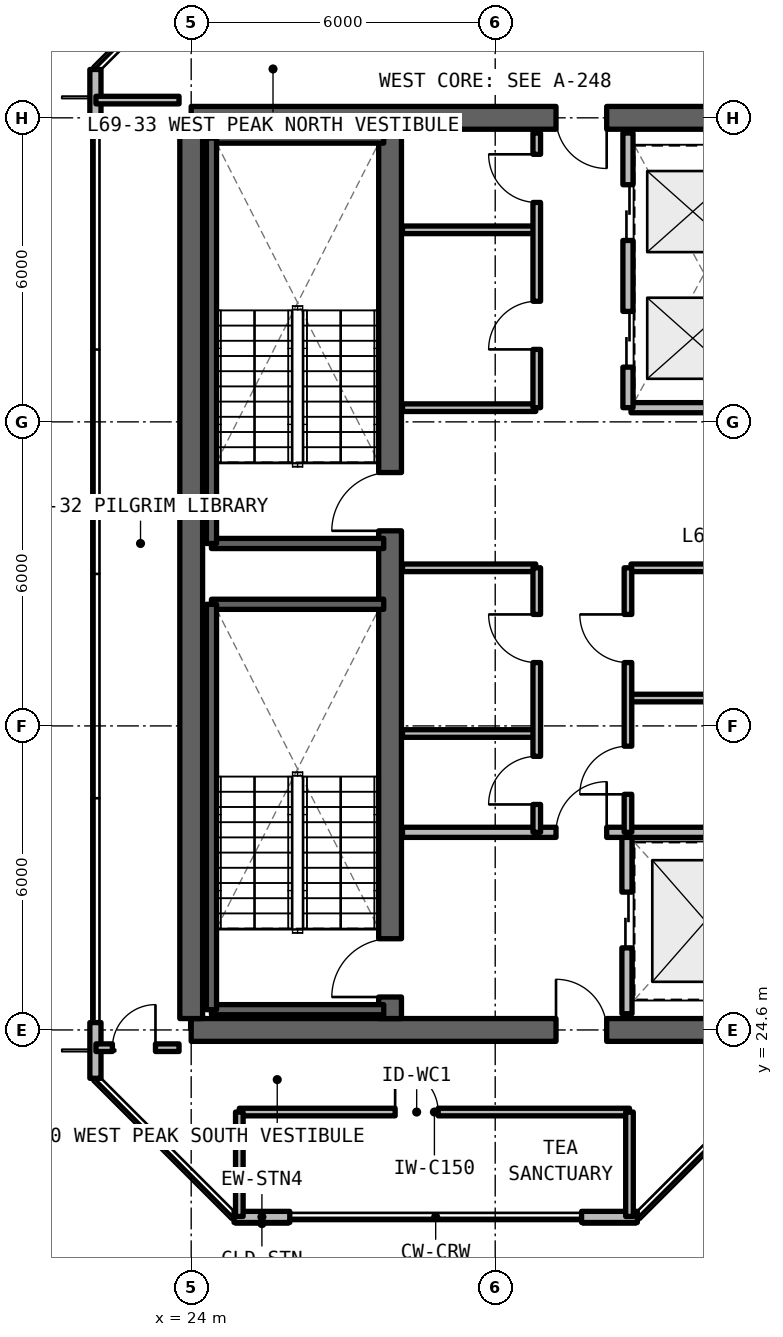
"""IFC4 building model, lengths in metres.
Left out: names, types, materials, properties, quantities, classifications, styles, units other than length and angle.
Written with IfcOpenShell. Run it as: python <this file> out.ifc"""

import sys

from ifc_helpers import new_model, si_unit, direction, frame, frame_2d, origin, place, context, subcontext, project, spatial, rectangle, extrude, element, fill, save


model = new_model("IFC4")
c1 = context("Model", 3, precision=1e-05, world=origin(), true_north=direction((0.0, 1.0)))
c2 = subcontext(c1, "Body", "Model", "MODEL_VIEW")
j1 = project(units=[si_unit("LENGTHUNIT", "METRE"), si_unit("PLANEANGLEUNIT", "RADIAN")], contexts=[c1])
p1 = place(None, origin())
s1 = spatial("IfcSite", under=j1, at=p1, CompositionType="ELEMENT")
p2 = place(p1, origin())
s2 = spatial("IfcBuilding", under=s1, at=p2, CompositionType="ELEMENT")
p3 = place(p2, frame((0.0, 0.0, 246.18)))
s3 = spatial("IfcBuildingStorey", under=s2, at=p3, CompositionType="ELEMENT", Elevation=246.18)
p4 = place(p3, frame((24.0, 24.6, 0.0), z_axis=(0.0, 0.0, 1.0), x_axis=(1.0, 0.0, 0.0)))
e1 = element("IfcWall", 1, at=p4, inside=s3, PredefinedType="SHEAR", context=c2, shape_type="SweptSolid", body=[
    extrude(rectangle(XDim=12.0, YDim=0.45, at=frame_2d((6.0, 0.0))), origin(), (0.0, 0.0, 1.0), 3.63),
])
p5 = place(p4, frame((7.2, 0.0, 0.0)))
e2 = element("IfcOpeningElement", 2, at=p5, cuts=e1, PredefinedType="OPENING", context=c2, shape_type="SweptSolid", body=[
    extrude(rectangle(XDim=1.0, YDim=2.15, at=frame_2d((0.5, 1.075))), frame((0.0, 0.235, 0.0), z_axis=(0.0, -1.0, 0.0), x_axis=(1.0, 0.0, 0.0)), (0.0, 0.0, 1.0), 0.47),
])
p6 = place(p3, frame((36.0, 42.6, 0.0), z_axis=(0.0, 0.0, 1.0), x_axis=(-1.0, 0.0, 0.0)))
e3 = element("IfcWall", 3, at=p6, inside=s3, PredefinedType="SHEAR", context=c2, shape_type="SweptSolid", body=[
    extrude(rectangle(XDim=12.0, YDim=0.45, at=frame_2d((6.0, 0.0))), origin(), (0.0, 0.0, 1.0), 3.63),
])
p7 = place(p6, frame((3.8, 0.0, 0.0)))
e4 = element("IfcOpeningElement", 4, at=p7, cuts=e3, PredefinedType="OPENING", context=c2, shape_type="SweptSolid", body=[
    extrude(rectangle(XDim=1.0, YDim=2.15, at=frame_2d((0.5, 1.075))), frame((0.0, 0.235, 0.0), z_axis=(0.0, -1.0, 0.0), x_axis=(1.0, 0.0, 0.0)), (0.0, 0.0, 1.0), 0.47),
])
p8 = place(p3, frame((24.0, 24.825, 0.0), z_axis=(0.0, 0.0, 1.0), x_axis=(0.0, 1.0, 0.0)))
e5 = element("IfcWall", 5, at=p8, inside=s3, PredefinedType="SHEAR", context=c2, shape_type="SweptSolid", body=[
    extrude(rectangle(XDim=17.55, YDim=0.45, at=frame_2d((8.775, 0.0))), origin(), (0.0, 0.0, 1.0), 3.63),
])
p9 = place(p3, frame((27.925, 24.825, 0.0), z_axis=(0.0, 0.0, 1.0), x_axis=(0.0, 1.0, 0.0)))
e6 = element("IfcWall", 6, at=p9, inside=s3, PredefinedType="SHEAR", context=c2, shape_type="SweptSolid", body=[
    extrude(rectangle(XDim=17.55, YDim=0.45, at=frame_2d((8.775, 0.0))), origin(), (0.0, 0.0, 1.0), 3.63),
])
p10 = place(p9, frame((0.425, 0.0, 0.0)))
e7 = element("IfcOpeningElement", 7, at=p10, cuts=e6, PredefinedType="OPENING", context=c2, shape_type="SweptSolid", body=[
    extrude(rectangle(XDim=1.15, YDim=2.15, at=frame_2d((0.575, 1.075))), frame((0.0, 0.235, 0.0), z_axis=(0.0, -1.0, 0.0), x_axis=(1.0, 0.0, 0.0)), (0.0, 0.0, 1.0), 0.47),
])
p11 = place(p9, frame((9.625, 0.0, 0.0)))
e8 = element("IfcOpeningElement", 8, at=p11, cuts=e6, PredefinedType="OPENING", context=c2, shape_type="SweptSolid", body=[
    extrude(rectangle(XDim=1.15, YDim=2.15, at=frame_2d((0.575, 1.075))), frame((0.0, 0.235, 0.0), z_axis=(0.0, -1.0, 0.0), x_axis=(1.0, 0.0, 0.0)), (0.0, 0.0, 1.0), 0.47),
])
p12 = place(p3, frame((24.846, 20.91, 0.0), z_axis=(0.0, 0.0, 1.0), x_axis=(1.0, 0.0, 0.0)))
e9 = element("IfcWall", 9, at=p12, inside=s3, PredefinedType="SOLIDWALL", context=c2, shape_type="SweptSolid", body=[
    extrude(rectangle(XDim=1.1, YDim=0.22, at=frame_2d((0.55, 0.0))), origin(), (0.0, 0.0, 1.0), 3.41),
])
for number, where, z_axis, x_axis in (
    (10, (31.704, 20.91, 0.0), (0.0, 0.0, 1.0), (1.0, 0.0, 0.0)),
    (11, (22.11, 43.554, 0.0), (0.0, 0.0, 1.0), (0.0, -1.0, 0.0)),
    (12, (22.11, 24.746, 0.0), (0.0, 0.0, 1.0), (0.0, -1.0, 0.0)),
):
    element("IfcWall", number, at=place(p3, frame(where, z_axis=z_axis, x_axis=x_axis)), inside=s3, PredefinedType="SOLIDWALL", context=c2, shape_type="SweptSolid", body=[
        extrude(rectangle(XDim=1.1, YDim=0.22, at=frame_2d((0.55, 0.0))), origin(), (0.0, 0.0, 1.0), 3.41),
    ])
p13 = place(p3, frame((32.6, 24.92, 0.0), z_axis=(0.0, 0.0, 1.0), x_axis=(0.0, 1.0, 0.0)))
e13 = element("IfcWall", 13, at=p13, inside=s3, PredefinedType="SOLIDWALL", context=c2, shape_type="SweptSolid", body=[
    extrude(rectangle(XDim=3.58, YDim=0.2, at=frame_2d((1.79, 0.0))), origin(), (0.0, 0.0, 1.0), 2.63),
])
p14 = place(p13, frame((1.3, 0.0, 0.0)))
e14 = element("IfcOpeningElement", 14, at=p14, cuts=e13, PredefinedType="OPENING", context=c2, shape_type="SweptSolid", body=[
    extrude(rectangle(XDim=1.1, YDim=2.2, at=frame_2d((0.55, 1.1))), frame((0.0, 0.11, 0.0), z_axis=(0.0, -1.0, 0.0), x_axis=(1.0, 0.0, 0.0)), (0.0, 0.0, 1.0), 0.22),
])
p15 = place(p3, frame((28.17, 28.5, 0.0), z_axis=(0.0, 0.0, 1.0), x_axis=(1.0, 0.0, 0.0)))
e15 = element("IfcWall", 15, at=p15, inside=s3, PredefinedType="SOLIDWALL", context=c2, shape_type="SweptSolid", body=[
    extrude(rectangle(XDim=7.585, YDim=0.2, at=frame_2d((3.792, 0.0))), origin(), (0.0, 0.0, 1.0), 2.63),
])
p16 = place(p15, frame((3.03, 0.0, 0.0)))
e16 = element("IfcOpeningElement", 16, at=p16, cuts=e15, PredefinedType="OPENING", context=c2, shape_type="SweptSolid", body=[
    extrude(rectangle(XDim=1.0, YDim=2.15, at=frame_2d((0.5, 1.075))), frame((0.0, 0.11, 0.0), z_axis=(0.0, -1.0, 0.0), x_axis=(1.0, 0.0, 0.0)), (0.0, 0.0, 1.0), 0.22),
])
for number, where, z_axis, x_axis in (
    (17, (28.17, 30.45, 0.0), (0.0, 0.0, 1.0), (1.0, 0.0, 0.0)),
    (18, (28.17, 33.72, 0.0), (0.0, 0.0, 1.0), (1.0, 0.0, 0.0)),
):
    element("IfcWall", number, at=place(p3, frame(where, z_axis=z_axis, x_axis=x_axis)), inside=s3, PredefinedType="SOLIDWALL", context=c2, shape_type="SweptSolid", body=[
        extrude(rectangle(XDim=2.63, YDim=0.15, at=frame_2d((1.315, 0.0))), origin(), (0.0, 0.0, 1.0), 2.63),
    ])
p17 = place(p3, frame((30.82, 28.5, 0.0), z_axis=(0.0, 0.0, 1.0), x_axis=(0.0, 1.0, 0.0)))
e19 = element("IfcWall", 19, at=p17, inside=s3, PredefinedType="SOLIDWALL", context=c2, shape_type="SweptSolid", body=[
    extrude(rectangle(XDim=5.22, YDim=0.15, at=frame_2d((2.61, 0.0))), origin(), (0.0, 0.0, 1.0), 2.63),
])
p18 = place(p17, frame((0.55, 0.0, 0.0)))
e20 = element("IfcOpeningElement", 20, at=p18, cuts=e19, PredefinedType="OPENING", context=c2, shape_type="SweptSolid", body=[
    extrude(rectangle(XDim=0.95, YDim=2.15, at=frame_2d((0.475, 1.075))), frame((0.0, 0.085, 0.0), z_axis=(0.0, -1.0, 0.0), x_axis=(1.0, 0.0, 0.0)), (0.0, 0.0, 1.0), 0.17),
])
p19 = place(p17, frame((3.35, 0.0, 0.0)))
e21 = element("IfcOpeningElement", 21, at=p19, cuts=e19, PredefinedType="OPENING", context=c2, shape_type="SweptSolid", body=[
    extrude(rectangle(XDim=0.95, YDim=2.15, at=frame_2d((0.475, 1.075))), frame((0.0, 0.085, 0.0), z_axis=(0.0, -1.0, 0.0), x_axis=(1.0, 0.0, 0.0)), (0.0, 0.0, 1.0), 0.17),
])
for number, where, z_axis, x_axis in (
    (22, (32.68, 31.15, 0.0), (0.0, 0.0, 1.0), (1.0, 0.0, 0.0)),
    (23, (32.68, 33.72, 0.0), (0.0, 0.0, 1.0), (1.0, 0.0, 0.0)),
):
    element("IfcWall", number, at=place(p3, frame(where, z_axis=z_axis, x_axis=x_axis)), inside=s3, PredefinedType="SOLIDWALL", context=c2, shape_type="SweptSolid", body=[
        extrude(rectangle(XDim=3.075, YDim=0.15, at=frame_2d((1.538, 0.0))), origin(), (0.0, 0.0, 1.0), 2.63),
    ])
p20 = place(p3, frame((32.62, 28.5, 0.0), z_axis=(0.0, 0.0, 1.0), x_axis=(0.0, 1.0, 0.0)))
e24 = element("IfcWall", 24, at=p20, inside=s3, PredefinedType="SOLIDWALL", context=c2, shape_type="SweptSolid", body=[
    extrude(rectangle(XDim=5.22, YDim=0.15, at=frame_2d((2.61, 0.0))), origin(), (0.0, 0.0, 1.0), 2.63),
])
p21 = place(p20, frame((0.75, 0.0, 0.0)))
e25 = element("IfcOpeningElement", 25, at=p21, cuts=e24, PredefinedType="OPENING", context=c2, shape_type="SweptSolid", body=[
    extrude(rectangle(XDim=0.95, YDim=2.15, at=frame_2d((0.475, 1.075))), frame((0.0, 0.085, 0.0), z_axis=(0.0, -1.0, 0.0), x_axis=(1.0, 0.0, 0.0)), (0.0, 0.0, 1.0), 0.17),
])
p22 = place(p20, frame((3.35, 0.0, 0.0)))
e26 = element("IfcOpeningElement", 26, at=p22, cuts=e24, PredefinedType="OPENING", context=c2, shape_type="SweptSolid", body=[
    extrude(rectangle(XDim=0.95, YDim=2.15, at=frame_2d((0.475, 1.075))), frame((0.0, 0.085, 0.0), z_axis=(0.0, -1.0, 0.0), x_axis=(1.0, 0.0, 0.0)), (0.0, 0.0, 1.0), 0.17),
])
for number, where, z_axis, x_axis in (
    (27, (28.17, 36.88, 0.0), (0.0, 0.0, 1.0), (1.0, 0.0, 0.0)),
    (28, (28.17, 40.39, 0.0), (0.0, 0.0, 1.0), (1.0, 0.0, 0.0)),
):
    element("IfcWall", number, at=place(p3, frame(where, z_axis=z_axis, x_axis=x_axis)), inside=s3, PredefinedType="SOLIDWALL", context=c2, shape_type="SweptSolid", body=[
        extrude(rectangle(XDim=2.63, YDim=0.15, at=frame_2d((1.315, 0.0))), origin(), (0.0, 0.0, 1.0), 2.63),
    ])
p23 = place(p3, frame((30.82, 36.88, 0.0), z_axis=(0.0, 0.0, 1.0), x_axis=(0.0, 1.0, 0.0)))
e29 = element("IfcWall", 29, at=p23, inside=s3, PredefinedType="SOLIDWALL", context=c2, shape_type="SweptSolid", body=[
    extrude(rectangle(XDim=5.42, YDim=0.15, at=frame_2d((2.71, 0.0))), origin(), (0.0, 0.0, 1.0), 2.63),
])
p24 = place(p23, frame((1.15, 0.0, 0.0)))
e30 = element("IfcOpeningElement", 30, at=p24, cuts=e29, PredefinedType="OPENING", context=c2, shape_type="SweptSolid", body=[
    extrude(rectangle(XDim=0.95, YDim=2.15, at=frame_2d((0.475, 1.075))), frame((0.0, 0.085, 0.0), z_axis=(0.0, -1.0, 0.0), x_axis=(1.0, 0.0, 0.0)), (0.0, 0.0, 1.0), 0.17),
])
p25 = place(p23, frame((4.05, 0.0, 0.0)))
e31 = element("IfcOpeningElement", 31, at=p25, cuts=e29, PredefinedType="OPENING", context=c2, shape_type="SweptSolid", body=[
    extrude(rectangle(XDim=0.95, YDim=2.15, at=frame_2d((0.475, 1.075))), frame((0.0, 0.085, 0.0), z_axis=(0.0, -1.0, 0.0), x_axis=(1.0, 0.0, 0.0)), (0.0, 0.0, 1.0), 0.17),
])
p26 = place(p3, frame((32.68, 36.88, 0.0), z_axis=(0.0, 0.0, 1.0), x_axis=(1.0, 0.0, 0.0)))
e32 = element("IfcWall", 32, at=p26, inside=s3, PredefinedType="SOLIDWALL", context=c2, shape_type="SweptSolid", body=[
    extrude(rectangle(XDim=3.075, YDim=0.2, at=frame_2d((1.538, 0.0))), origin(), (0.0, 0.0, 1.0), 2.63),
])
p27 = place(p3, frame((32.62, 36.88, 0.0), z_axis=(0.0, 0.0, 1.0), x_axis=(0.0, 1.0, 0.0)))
e33 = element("IfcWall", 33, at=p27, inside=s3, PredefinedType="SOLIDWALL", context=c2, shape_type="SweptSolid", body=[
    extrude(rectangle(XDim=5.42, YDim=0.2, at=frame_2d((2.71, 0.0))), origin(), (0.0, 0.0, 1.0), 2.63),
])
p28 = place(p27, frame((0.8, 0.0, 0.0)))
e34 = element("IfcOpeningElement", 34, at=p28, cuts=e33, PredefinedType="OPENING", context=c2, shape_type="SweptSolid", body=[
    extrude(rectangle(XDim=1.1, YDim=2.2, at=frame_2d((0.55, 1.1))), frame((0.0, 0.11, 0.0), z_axis=(0.0, -1.0, 0.0), x_axis=(1.0, 0.0, 0.0)), (0.0, 0.0, 1.0), 0.22),
])
p29 = place(p27, frame((3.3, 0.0, 0.0)))
e35 = element("IfcOpeningElement", 35, at=p29, cuts=e33, PredefinedType="OPENING", context=c2, shape_type="SweptSolid", body=[
    extrude(rectangle(XDim=1.1, YDim=2.2, at=frame_2d((0.55, 1.1))), frame((0.0, 0.11, 0.0), z_axis=(0.0, -1.0, 0.0), x_axis=(1.0, 0.0, 0.0)), (0.0, 0.0, 1.0), 0.22),
])
p30 = place(p3, frame((24.95, 22.98, 0.0), z_axis=(0.0, 0.0, 1.0), x_axis=(1.0, 0.0, 0.0)))
e36 = element("IfcWall", 36, at=p30, inside=s3, PredefinedType="SOLIDWALL", context=c2, shape_type="SweptSolid", body=[
    extrude(rectangle(XDim=7.7, YDim=0.15, at=frame_2d((3.85, 0.0))), origin(), (0.0, 0.0, 1.0), 2.63),
])
p31 = place(p30, frame((3.075, 0.0, 0.0)))
e37 = element("IfcOpeningElement", 37, at=p31, cuts=e36, PredefinedType="OPENING", context=c2, shape_type="SweptSolid", body=[
    extrude(rectangle(XDim=0.85, YDim=2.1, at=frame_2d((0.425, 1.05))), frame((0.0, 0.085, 0.0), z_axis=(0.0, -1.0, 0.0), x_axis=(1.0, 0.0, 0.0)), (0.0, 0.0, 1.0), 0.17),
])
for number, where, z_axis, x_axis in (
    (38, (24.95, 20.92, 0.0), (0.0, 0.0, 1.0), (0.0, 1.0, 0.0)),
    (39, (32.65, 20.92, 0.0), (0.0, 0.0, 1.0), (0.0, 1.0, 0.0)),
):
    element("IfcWall", number, at=place(p3, frame(where, z_axis=z_axis, x_axis=x_axis)), inside=s3, PredefinedType="SOLIDWALL", context=c2, shape_type="SweptSolid", body=[
        extrude(rectangle(XDim=2.06, YDim=0.15, at=frame_2d((1.03, 0.0))), origin(), (0.0, 0.0, 1.0), 2.63),
    ])
p32 = place(p3, frame((22.12, 24.25, 0.0), z_axis=(0.0, 0.0, 1.0), x_axis=(1.0, 0.0, 0.0)))
e40 = element("IfcWall", 40, at=p32, inside=s3, PredefinedType="SOLIDWALL", context=c2, shape_type="SweptSolid", body=[
    extrude(rectangle(XDim=1.64, YDim=0.15, at=frame_2d((0.82, 0.0))), origin(), (0.0, 0.0, 1.0), 2.63),
])
p33 = place(p32, frame((0.325, 0.0, 0.0)))
e41 = element("IfcOpeningElement", 41, at=p33, cuts=e40, PredefinedType="OPENING", context=c2, shape_type="SweptSolid", body=[
    extrude(rectangle(XDim=0.85, YDim=2.1, at=frame_2d((0.425, 1.05))), frame((0.0, 0.085, 0.0), z_axis=(0.0, -1.0, 0.0), x_axis=(1.0, 0.0, 0.0)), (0.0, 0.0, 1.0), 0.17),
])
p34 = place(p3, frame((22.12, 42.95, 0.0), z_axis=(0.0, 0.0, 1.0), x_axis=(1.0, 0.0, 0.0)))
e42 = element("IfcWall", 42, at=p34, inside=s3, PredefinedType="SOLIDWALL", context=c2, shape_type="SweptSolid", body=[
    extrude(rectangle(XDim=1.64, YDim=0.15, at=frame_2d((0.82, 0.0))), origin(), (0.0, 0.0, 1.0), 2.63),
])
for number, where, z_axis, x_axis in (
    (43, (24.4, 25.0, 0.0), (0.0, 0.0, 1.0), (1.0, 0.0, 0.0)),
    (44, (27.8, 33.0, 0.0), (0.0, 0.0, 1.0), (-1.0, 0.0, 0.0)),
):
    element("IfcWall", number, at=place(p3, frame(where, z_axis=z_axis, x_axis=x_axis)), inside=s3, PredefinedType="SOLIDWALL", context=c2, shape_type="SweptSolid", body=[
        extrude(rectangle(XDim=3.4, YDim=0.2, at=frame_2d((1.7, 0.0))), origin(), (0.0, 0.0, 1.0), 3.63),
    ])
p35 = place(p3, frame((24.4, 33.0, 0.0), z_axis=(0.0, 0.0, 1.0), x_axis=(0.0, -1.0, 0.0)))
e45 = element("IfcWall", 45, at=p35, inside=s3, PredefinedType="SOLIDWALL", context=c2, shape_type="SweptSolid", body=[
    extrude(rectangle(XDim=8.0, YDim=0.2, at=frame_2d((4.0, 0.0))), origin(), (0.0, 0.0, 1.0), 3.63),
])
for number, where, z_axis, x_axis in (
    (46, (24.4, 34.2, 0.0), (0.0, 0.0, 1.0), (1.0, 0.0, 0.0)),
    (47, (27.8, 42.2, 0.0), (0.0, 0.0, 1.0), (-1.0, 0.0, 0.0)),
):
    element("IfcWall", number, at=place(p3, frame(where, z_axis=z_axis, x_axis=x_axis)), inside=s3, PredefinedType="SOLIDWALL", context=c2, shape_type="SweptSolid", body=[
        extrude(rectangle(XDim=3.4, YDim=0.2, at=frame_2d((1.7, 0.0))), origin(), (0.0, 0.0, 1.0), 3.63),
    ])
p36 = place(p3, frame((24.4, 42.2, 0.0), z_axis=(0.0, 0.0, 1.0), x_axis=(0.0, -1.0, 0.0)))
e48 = element("IfcWall", 48, at=p36, inside=s3, PredefinedType="SOLIDWALL", context=c2, shape_type="SweptSolid", body=[
    extrude(rectangle(XDim=8.0, YDim=0.2, at=frame_2d((4.0, 0.0))), origin(), (0.0, 0.0, 1.0), 3.63),
])
p37 = place(p14, origin())
e49 = element("IfcDoor", 49, at=p37, inside=s3, OperationType="SLIDING_TO_LEFT", PredefinedType="DOOR", context=c2, shape_type="SweptSolid", body=[
    extrude(rectangle(XDim=1.1, YDim=2.2, at=frame_2d((0.55, 1.1))), frame((0.0, 0.025, 0.0), z_axis=(0.0, -1.0, 0.0), x_axis=(1.0, 0.0, 0.0)), (0.0, 0.0, 1.0), 0.05),
])
fill(e14, e49)
p38 = place(p16, origin())
e50 = element("IfcDoor", 50, at=p38, inside=s3, OperationType="SINGLE_SWING_RIGHT", PredefinedType="DOOR", context=c2, shape_type="SweptSolid", body=[
    extrude(rectangle(XDim=1.0, YDim=2.15, at=frame_2d((0.5, 1.075))), frame((0.0, 0.025, 0.0), z_axis=(0.0, -1.0, 0.0), x_axis=(1.0, 0.0, 0.0)), (0.0, 0.0, 1.0), 0.05),
])
fill(e16, e50)
p39 = place(p18, origin())
e51 = element("IfcDoor", 51, at=p39, inside=s3, OperationType="SINGLE_SWING_LEFT", PredefinedType="DOOR", context=c2, shape_type="SweptSolid", body=[
    extrude(rectangle(XDim=0.95, YDim=2.15, at=frame_2d((0.475, 1.075))), frame((0.0, 0.025, 0.0), z_axis=(0.0, -1.0, 0.0), x_axis=(1.0, 0.0, 0.0)), (0.0, 0.0, 1.0), 0.05),
])
fill(e20, e51)
p40 = place(p19, origin())
e52 = element("IfcDoor", 52, at=p40, inside=s3, OperationType="SINGLE_SWING_RIGHT", PredefinedType="DOOR", context=c2, shape_type="SweptSolid", body=[
    extrude(rectangle(XDim=0.95, YDim=2.15, at=frame_2d((0.475, 1.075))), frame((0.0, 0.025, 0.0), z_axis=(0.0, -1.0, 0.0), x_axis=(1.0, 0.0, 0.0)), (0.0, 0.0, 1.0), 0.05),
])
fill(e21, e52)
p41 = place(p21, origin())
e53 = element("IfcDoor", 53, at=p41, inside=s3, OperationType="SINGLE_SWING_LEFT", PredefinedType="DOOR", context=c2, shape_type="SweptSolid", body=[
    extrude(rectangle(XDim=0.95, YDim=2.15, at=frame_2d((0.475, 1.075))), frame((0.0, 0.025, 0.0), z_axis=(0.0, -1.0, 0.0), x_axis=(1.0, 0.0, 0.0)), (0.0, 0.0, 1.0), 0.05),
])
fill(e25, e53)
p42 = place(p22, origin())
e54 = element("IfcDoor", 54, at=p42, inside=s3, OperationType="SINGLE_SWING_RIGHT", PredefinedType="DOOR", context=c2, shape_type="SweptSolid", body=[
    extrude(rectangle(XDim=0.95, YDim=2.15, at=frame_2d((0.475, 1.075))), frame((0.0, 0.025, 0.0), z_axis=(0.0, -1.0, 0.0), x_axis=(1.0, 0.0, 0.0)), (0.0, 0.0, 1.0), 0.05),
])
fill(e26, e54)
p43 = place(p24, origin())
e55 = element("IfcDoor", 55, at=p43, inside=s3, OperationType="SINGLE_SWING_LEFT", PredefinedType="DOOR", context=c2, shape_type="SweptSolid", body=[
    extrude(rectangle(XDim=0.95, YDim=2.15, at=frame_2d((0.475, 1.075))), frame((0.0, 0.025, 0.0), z_axis=(0.0, -1.0, 0.0), x_axis=(1.0, 0.0, 0.0)), (0.0, 0.0, 1.0), 0.05),
])
fill(e30, e55)
p44 = place(p25, origin())
e56 = element("IfcDoor", 56, at=p44, inside=s3, OperationType="SINGLE_SWING_RIGHT", PredefinedType="DOOR", context=c2, shape_type="SweptSolid", body=[
    extrude(rectangle(XDim=0.95, YDim=2.15, at=frame_2d((0.475, 1.075))), frame((0.0, 0.025, 0.0), z_axis=(0.0, -1.0, 0.0), x_axis=(1.0, 0.0, 0.0)), (0.0, 0.0, 1.0), 0.05),
])
fill(e31, e56)
p45 = place(p28, origin())
e57 = element("IfcDoor", 57, at=p45, inside=s3, OperationType="SLIDING_TO_LEFT", PredefinedType="DOOR", context=c2, shape_type="SweptSolid", body=[
    extrude(rectangle(XDim=1.1, YDim=2.2, at=frame_2d((0.55, 1.1))), frame((0.0, 0.025, 0.0), z_axis=(0.0, -1.0, 0.0), x_axis=(1.0, 0.0, 0.0)), (0.0, 0.0, 1.0), 0.05),
])
fill(e34, e57)
p46 = place(p29, origin())
e58 = element("IfcDoor", 58, at=p46, inside=s3, OperationType="SLIDING_TO_RIGHT", PredefinedType="DOOR", context=c2, shape_type="SweptSolid", body=[
    extrude(rectangle(XDim=1.1, YDim=2.2, at=frame_2d((0.55, 1.1))), frame((0.0, 0.025, 0.0), z_axis=(0.0, -1.0, 0.0), x_axis=(1.0, 0.0, 0.0)), (0.0, 0.0, 1.0), 0.05),
])
fill(e35, e58)
p47 = place(p31, origin())
e59 = element("IfcDoor", 59, at=p47, inside=s3, OperationType="SINGLE_SWING_LEFT", PredefinedType="DOOR", context=c2, shape_type="SweptSolid", body=[
    extrude(rectangle(XDim=0.85, YDim=2.1, at=frame_2d((0.425, 1.05))), frame((0.0, 0.025, 0.0), z_axis=(0.0, -1.0, 0.0), x_axis=(1.0, 0.0, 0.0)), (0.0, 0.0, 1.0), 0.05),
])
fill(e37, e59)
p48 = place(p33, origin())
e60 = element("IfcDoor", 60, at=p48, inside=s3, OperationType="SINGLE_SWING_RIGHT", PredefinedType="DOOR", context=c2, shape_type="SweptSolid", body=[
    extrude(rectangle(XDim=0.85, YDim=2.1, at=frame_2d((0.425, 1.05))), frame((0.0, 0.025, 0.0), z_axis=(0.0, -1.0, 0.0), x_axis=(1.0, 0.0, 0.0)), (0.0, 0.0, 1.0), 0.05),
])
fill(e41, e60)
p49 = place(p10, origin())
e61 = element("IfcDoor", 61, at=p49, inside=s3, OperationType="SINGLE_SWING_LEFT", PredefinedType="DOOR", context=c2, shape_type="SweptSolid", body=[
    extrude(rectangle(XDim=1.15, YDim=2.15, at=frame_2d((0.575, 1.075))), frame((0.0, 0.025, 0.0), z_axis=(0.0, -1.0, 0.0), x_axis=(1.0, 0.0, 0.0)), (0.0, 0.0, 1.0), 0.05),
])
fill(e7, e61)
p50 = place(p11, origin())
e62 = element("IfcDoor", 62, at=p50, inside=s3, OperationType="SINGLE_SWING_RIGHT", PredefinedType="DOOR", context=c2, shape_type="SweptSolid", body=[
    extrude(rectangle(XDim=1.15, YDim=2.15, at=frame_2d((0.575, 1.075))), frame((0.0, 0.025, 0.0), z_axis=(0.0, -1.0, 0.0), x_axis=(1.0, 0.0, 0.0)), (0.0, 0.0, 1.0), 0.05),
])
fill(e8, e62)
p51 = place(p5, origin())
e63 = element("IfcDoor", 63, at=p51, inside=s3, OperationType="SINGLE_SWING_LEFT", PredefinedType="DOOR", context=c2, shape_type="SweptSolid", body=[
    extrude(rectangle(XDim=1.0, YDim=2.15, at=frame_2d((0.5, 1.075))), frame((0.0, 0.025, 0.0), z_axis=(0.0, -1.0, 0.0), x_axis=(1.0, 0.0, 0.0)), (0.0, 0.0, 1.0), 0.05),
])
fill(e2, e63)
p52 = place(p7, origin())
e64 = element("IfcDoor", 64, at=p52, inside=s3, OperationType="SINGLE_SWING_RIGHT", PredefinedType="DOOR", context=c2, shape_type="SweptSolid", body=[
    extrude(rectangle(XDim=1.0, YDim=2.15, at=frame_2d((0.5, 1.075))), frame((0.0, 0.025, 0.0), z_axis=(0.0, -1.0, 0.0), x_axis=(1.0, 0.0, 0.0)), (0.0, 0.0, 1.0), 0.05),
])
fill(e4, e64)
save(model, sys.argv[1])
